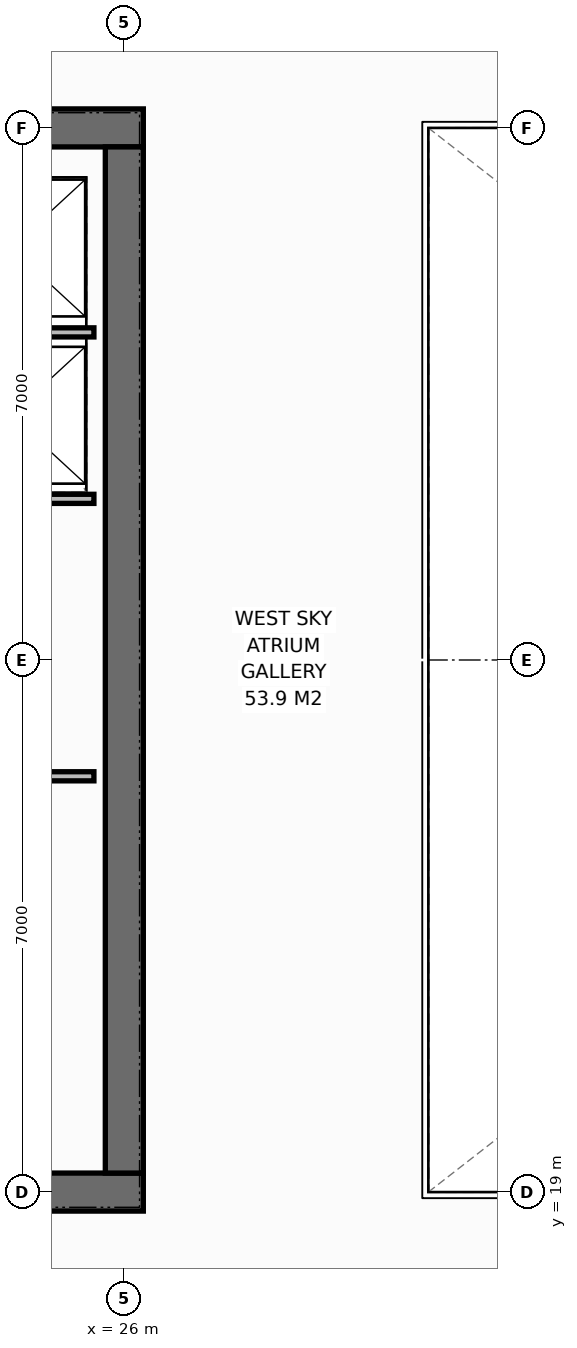
"""IFC4 building model, lengths in metres.
Left out: names, types, materials, properties, quantities, classifications, styles, units other than length and angle.
Written with IfcOpenShell. Run it as: python <this file> out.ifc"""

import sys

from ifc_helpers import new_model, si_unit, direction, frame, frame_2d, origin, place, context, subcontext, project, spatial, rectangle, extrude, element, save


model = new_model("IFC4")
c1 = context("Model", 3, precision=1e-05, world=origin(), true_north=direction((0.0, 1.0)))
c2 = subcontext(c1, "Body", "Model", "MODEL_VIEW")
j1 = project(units=[si_unit("LENGTHUNIT", "METRE"), si_unit("PLANEANGLEUNIT", "RADIAN")], contexts=[c1])
p1 = place(None, origin())
s1 = spatial("IfcSite", under=j1, at=p1, CompositionType="ELEMENT")
p2 = place(p1, origin())
s2 = spatial("IfcBuilding", under=s1, at=p2, CompositionType="ELEMENT")
p3 = place(p2, frame((0.0, 0.0, 298.4)))
s3 = spatial("IfcBuildingStorey", under=s2, at=p3, CompositionType="ELEMENT", Elevation=298.4)
p4 = place(p3, frame((12.75, 19.0, 0.0), z_axis=(0.0, 0.0, 1.0), x_axis=(1.0, 0.0, 0.0)))
e1 = element("IfcWall", 1, at=p4, inside=s3, PredefinedType="SHEAR", context=c2, shape_type="SweptSolid", body=[
    extrude(rectangle(XDim=13.5, YDim=0.5, at=frame_2d((6.75, 0.0))), origin(), (0.0, 0.0, 1.0), 4.0),
])
p5 = place(p4, frame((9.13, 0.0, 0.0)))
e2 = element("IfcOpeningElement", 2, at=p5, cuts=e1, PredefinedType="OPENING", context=c2, shape_type="SweptSolid", body=[
    extrude(rectangle(XDim=1.4, YDim=2.2, at=frame_2d((0.7, 1.1))), frame((0.0, 0.26, 0.0), z_axis=(0.0, -1.0, 0.0), x_axis=(1.0, 0.0, 0.0)), (0.0, 0.0, 1.0), 0.52),
])
p6 = place(p3, frame((12.75, 33.0, 0.0), z_axis=(0.0, 0.0, 1.0), x_axis=(1.0, 0.0, 0.0)))
e3 = element("IfcWall", 3, at=p6, inside=s3, PredefinedType="SHEAR", context=c2, shape_type="SweptSolid", body=[
    extrude(rectangle(XDim=13.5, YDim=0.5, at=frame_2d((6.75, 0.0))), origin(), (0.0, 0.0, 1.0), 4.0),
])
p7 = place(p6, frame((1.15, 0.0, 0.0)))
e4 = element("IfcOpeningElement", 4, at=p7, cuts=e3, PredefinedType="OPENING", context=c2, shape_type="SweptSolid", body=[
    extrude(rectangle(XDim=0.9, YDim=2.15, at=frame_2d((0.45, 1.075))), frame((0.0, 0.26, 0.0), z_axis=(0.0, -1.0, 0.0), x_axis=(1.0, 0.0, 0.0)), (0.0, 0.0, 1.0), 0.52),
])
p8 = place(p6, frame((3.75, 0.0, 0.0)))
e5 = element("IfcOpeningElement", 5, at=p8, cuts=e3, PredefinedType="OPENING", context=c2, shape_type="SweptSolid", body=[
    extrude(rectangle(XDim=0.95, YDim=2.15, at=frame_2d((0.475, 1.075))), frame((0.0, 0.26, 0.0), z_axis=(0.0, -1.0, 0.0), x_axis=(1.0, 0.0, 0.0)), (0.0, 0.0, 1.0), 0.52),
])
p9 = place(p6, frame((6.75, 0.0, 0.0)))
e6 = element("IfcOpeningElement", 6, at=p9, cuts=e3, PredefinedType="OPENING", context=c2, shape_type="SweptSolid", body=[
    extrude(rectangle(XDim=0.95, YDim=2.15, at=frame_2d((0.475, 1.075))), frame((0.0, 0.26, 0.0), z_axis=(0.0, -1.0, 0.0), x_axis=(1.0, 0.0, 0.0)), (0.0, 0.0, 1.0), 0.52),
])
p10 = place(p6, frame((9.13, 0.0, 0.0)))
e7 = element("IfcOpeningElement", 7, at=p10, cuts=e3, PredefinedType="OPENING", context=c2, shape_type="SweptSolid", body=[
    extrude(rectangle(XDim=1.4, YDim=2.2, at=frame_2d((0.7, 1.1))), frame((0.0, 0.26, 0.0), z_axis=(0.0, -1.0, 0.0), x_axis=(1.0, 0.0, 0.0)), (0.0, 0.0, 1.0), 0.52),
])
p11 = place(p3, frame((26.0, 19.25, 0.0), z_axis=(0.0, 0.0, 1.0), x_axis=(0.0, 1.0, 0.0)))
e8 = element("IfcWall", 8, at=p11, inside=s3, PredefinedType="SHEAR", context=c2, shape_type="SweptSolid", body=[
    extrude(rectangle(XDim=13.5, YDim=0.5, at=frame_2d((6.75, 0.0))), origin(), (0.0, 0.0, 1.0), 4.0),
])
for number, where, z_axis, x_axis in (
    (9, (23.4, 24.47, 0.0), (0.0, 0.0, 1.0), (1.0, 0.0, 0.0)),
    (10, (23.4, 28.12, 0.0), (0.0, 0.0, 1.0), (1.0, 0.0, 0.0)),
    (11, (23.4, 30.31, 0.0), (0.0, 0.0, 1.0), (1.0, 0.0, 0.0)),
):
    element("IfcWall", number, at=place(p3, frame(where, z_axis=z_axis, x_axis=x_axis)), inside=s3, PredefinedType="PARTITIONING", context=c2, shape_type="SweptSolid", body=[
        extrude(rectangle(XDim=2.2, YDim=0.12, at=frame_2d((1.1, 0.0))), origin(), (0.0, 0.0, 1.0), 3.788),
    ])
save(model, sys.argv[1])
